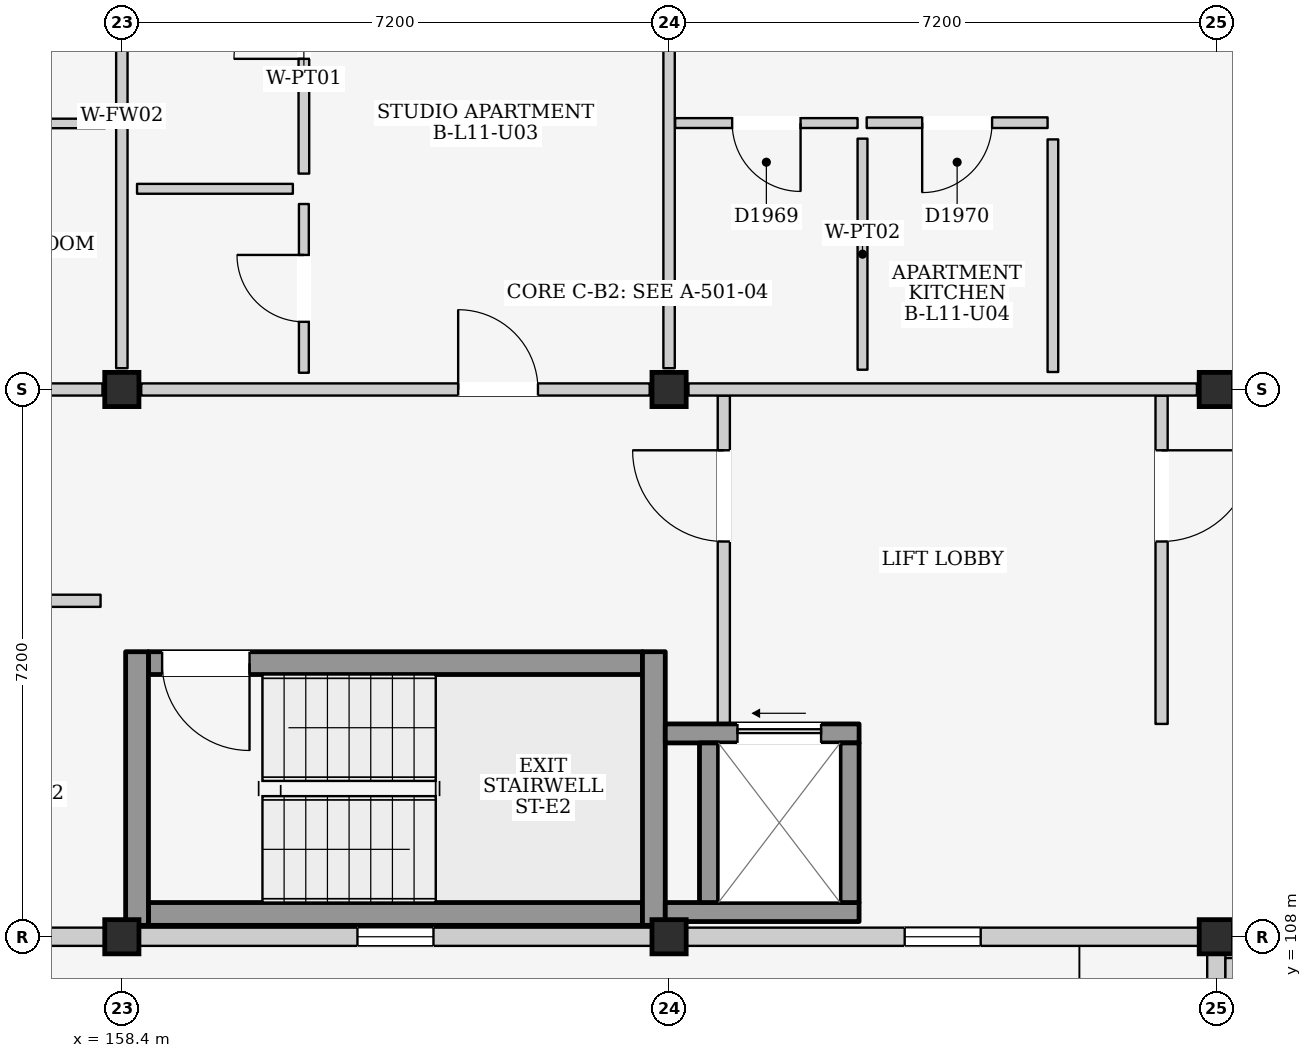
"""IFC4 building model, lengths in metres.
Left out: names, types, materials, properties, quantities, classifications, styles, units other than length and angle.
Written with IfcOpenShell. Run it as: python <this file> out.ifc"""

import sys

from ifc_helpers import new_model, si_unit, direction, frame, frame_2d, origin, origin_2d, place, context, subcontext, project, spatial, rectangle, extrude, element, fill, save


model = new_model("IFC4")
c1 = context("Model", 3, precision=1e-05, world=origin(), true_north=direction((0.0, 1.0)))
c2 = subcontext(c1, "Body", "Model", "MODEL_VIEW")
j1 = project(units=[si_unit("LENGTHUNIT", "METRE"), si_unit("PLANEANGLEUNIT", "RADIAN")], contexts=[c1])
p1 = place(None, origin())
s1 = spatial("IfcSite", under=j1, at=p1, CompositionType="ELEMENT")
p2 = place(p1, origin())
s2 = spatial("IfcBuilding", under=s1, at=p2, CompositionType="ELEMENT")
p3 = place(p2, frame((0.0, 0.0, 38.0)))
s3 = spatial("IfcBuildingStorey", under=s2, at=p3, CompositionType="ELEMENT", Elevation=38.0)
for number, where, z_axis, x_axis in (
    (1, (158.4, 108.0, 0.0), (0.0, 0.0, 1.0), (1.0, 0.0, 0.0)),
    (2, (158.4, 115.2, 0.0), (0.0, 0.0, 1.0), (1.0, 0.0, 0.0)),
    (3, (165.6, 108.0, 0.0), (0.0, 0.0, 1.0), (1.0, 0.0, 0.0)),
    (4, (165.6, 115.2, 0.0), (0.0, 0.0, 1.0), (1.0, 0.0, 0.0)),
    (5, (172.8, 108.0, 0.0), (0.0, 0.0, 1.0), (1.0, 0.0, 0.0)),
    (6, (172.8, 115.2, 0.0), (0.0, 0.0, 1.0), (1.0, 0.0, 0.0)),
):
    element("IfcColumn", number, at=place(p3, frame(where, z_axis=z_axis, x_axis=x_axis)), inside=s3, PredefinedType="COLUMN", context=c2, shape_type="SweptSolid", body=[
        extrude(rectangle(XDim=0.45, YDim=0.45, at=origin_2d()), origin(), (0.0, 0.0, 1.0), 3.2),
    ])
p4 = place(p3, frame((151.425, 108.0, 0.0), z_axis=(0.0, 0.0, 1.0), x_axis=(1.0, 0.0, 0.0)))
e7 = element("IfcWall", 7, at=p4, inside=s3, PredefinedType="ELEMENTEDWALL", context=c2, shape_type="SweptSolid", body=[
    extrude(rectangle(XDim=6.75, YDim=0.24, at=frame_2d((3.375, 0.0))), origin(), (0.0, 0.0, 1.0), 2.375),
])
p5 = place(p4, frame((1.1, 0.0, 0.0)))
e8 = element("IfcOpeningElement", 8, at=p5, cuts=e7, PredefinedType="OPENING", context=c2, shape_type="SweptSolid", body=[
    extrude(rectangle(XDim=1.5, YDim=2.12, at=frame_2d((0.75, 1.06))), frame((0.0, 0.135, 0.0), z_axis=(0.0, -1.0, 0.0), x_axis=(1.0, 0.0, 0.0)), (0.0, 0.0, 1.0), 0.27),
])
p6 = place(p4, frame((3.6, 0.0, 0.765)))
e9 = element("IfcOpeningElement", 9, at=p6, cuts=e7, PredefinedType="OPENING", context=c2, shape_type="SweptSolid", body=[
    extrude(rectangle(XDim=1.35, YDim=1.5, at=frame_2d((0.675, 0.75))), frame((0.0, 0.135, 0.0), z_axis=(0.0, -1.0, 0.0), x_axis=(1.0, 0.0, 0.0)), (0.0, 0.0, 1.0), 0.27),
])
p7 = place(p3, frame((158.625, 108.0, 0.0), z_axis=(0.0, 0.0, 1.0), x_axis=(1.0, 0.0, 0.0)))
e10 = element("IfcWall", 10, at=p7, inside=s3, PredefinedType="ELEMENTEDWALL", context=c2, shape_type="SweptSolid", body=[
    extrude(rectangle(XDim=6.75, YDim=0.24, at=frame_2d((3.375, 0.0))), origin(), (0.0, 0.0, 1.0), 2.375),
])
p8 = place(p7, frame((2.875, 0.0, 1.2)))
e11 = element("IfcOpeningElement", 11, at=p8, cuts=e10, PredefinedType="OPENING", context=c2, shape_type="SweptSolid", body=[
    extrude(rectangle(XDim=1.0, YDim=0.9, at=frame_2d((0.5, 0.45))), frame((0.0, 0.135, 0.0), z_axis=(0.0, -1.0, 0.0), x_axis=(1.0, 0.0, 0.0)), (0.0, 0.0, 1.0), 0.27),
])
p9 = place(p3, frame((165.825, 108.0, 0.0), z_axis=(0.0, 0.0, 1.0), x_axis=(1.0, 0.0, 0.0)))
e12 = element("IfcWall", 12, at=p9, inside=s3, PredefinedType="ELEMENTEDWALL", context=c2, shape_type="SweptSolid", body=[
    extrude(rectangle(XDim=6.75, YDim=0.24, at=frame_2d((3.375, 0.0))), origin(), (0.0, 0.0, 1.0), 2.375),
])
p10 = place(p9, frame((2.875, 0.0, 1.2)))
e13 = element("IfcOpeningElement", 13, at=p10, cuts=e12, PredefinedType="OPENING", context=c2, shape_type="SweptSolid", body=[
    extrude(rectangle(XDim=1.0, YDim=0.9, at=frame_2d((0.5, 0.45))), frame((0.0, 0.135, 0.0), z_axis=(0.0, -1.0, 0.0), x_axis=(1.0, 0.0, 0.0)), (0.0, 0.0, 1.0), 0.27),
])
p11 = place(p3, frame((172.8, 101.025, 0.0), z_axis=(0.0, 0.0, 1.0), x_axis=(0.0, 1.0, 0.0)))
e14 = element("IfcWall", 14, at=p11, inside=s3, PredefinedType="ELEMENTEDWALL", context=c2, shape_type="SweptSolid", body=[
    extrude(rectangle(XDim=6.75, YDim=0.24, at=frame_2d((3.375, 0.0))), origin(), (0.0, 0.0, 1.0), 2.475),
])
p12 = place(p11, frame((2.5, 0.0, 0.0)))
e15 = element("IfcOpeningElement", 15, at=p12, cuts=e14, PredefinedType="OPENING", context=c2, shape_type="SweptSolid", body=[
    extrude(rectangle(XDim=1.4, YDim=2.1, at=frame_2d((0.7, 1.05))), frame((0.0, 0.135, 0.0), z_axis=(0.0, -1.0, 0.0), x_axis=(1.0, 0.0, 0.0)), (0.0, 0.0, 1.0), 0.27),
])
p13 = place(p3, frame((158.75, 108.3, 0.0), z_axis=(0.0, 0.0, 1.0), x_axis=(1.0, 0.0, 0.0)))
e16 = element("IfcWall", 16, at=p13, inside=s3, PredefinedType="SHEAR", context=c2, shape_type="SweptSolid", body=[
    extrude(rectangle(XDim=6.5, YDim=0.3, at=frame_2d((3.25, 0.0))), origin(), (0.0, 0.0, 1.0), 2.99),
])
p14 = place(p3, frame((158.75, 111.6, 0.0), z_axis=(0.0, 0.0, 1.0), x_axis=(1.0, 0.0, 0.0)))
e17 = element("IfcWall", 17, at=p14, inside=s3, PredefinedType="SHEAR", context=c2, shape_type="SweptSolid", body=[
    extrude(rectangle(XDim=6.5, YDim=0.3, at=frame_2d((3.25, 0.0))), origin(), (0.0, 0.0, 1.0), 2.99),
])
p15 = place(p14, frame((0.18, 0.0, 0.0)))
e18 = element("IfcOpeningElement", 18, at=p15, cuts=e17, PredefinedType="OPENING", context=c2, shape_type="SweptSolid", body=[
    extrude(rectangle(XDim=1.15, YDim=2.2, at=frame_2d((0.575, 1.1))), frame((0.0, 0.165, 0.0), z_axis=(0.0, -1.0, 0.0), x_axis=(1.0, 0.0, 0.0)), (0.0, 0.0, 1.0), 0.33),
])
for number, where, z_axis, x_axis in (
    (19, (158.6, 108.15, 0.0), (0.0, 0.0, 1.0), (0.0, 1.0, 0.0)),
    (20, (165.4, 108.15, 0.0), (0.0, 0.0, 1.0), (0.0, 1.0, 0.0)),
):
    element("IfcWall", number, at=place(p3, frame(where, z_axis=z_axis, x_axis=x_axis)), inside=s3, PredefinedType="SHEAR", context=c2, shape_type="SweptSolid", body=[
        extrude(rectangle(XDim=3.6, YDim=0.3, at=frame_2d((1.8, 0.0))), origin(), (0.0, 0.0, 1.0), 2.99),
    ])
p16 = place(p3, frame((166.32, 110.8, 0.0), z_axis=(0.0, 0.0, 1.0), x_axis=(0.0, 1.0, 0.0)))
e21 = element("IfcWall", 21, at=p16, inside=s3, PredefinedType="PARTITIONING", context=c2, shape_type="SweptSolid", body=[
    extrude(rectangle(XDim=4.32, YDim=0.16, at=frame_2d((2.16, 0.0))), origin(), (0.0, 0.0, 1.0), 2.99),
])
p17 = place(p16, frame((2.4, 0.0, 0.0)))
e22 = element("IfcOpeningElement", 22, at=p17, cuts=e21, PredefinedType="OPENING", context=c2, shape_type="SweptSolid", body=[
    extrude(rectangle(XDim=1.2, YDim=2.2, at=frame_2d((0.6, 1.1))), frame((0.0, 0.095, 0.0), z_axis=(0.0, -1.0, 0.0), x_axis=(1.0, 0.0, 0.0)), (0.0, 0.0, 1.0), 0.19),
])
p18 = place(p3, frame((172.08, 110.8, 0.0), z_axis=(0.0, 0.0, 1.0), x_axis=(0.0, 1.0, 0.0)))
e23 = element("IfcWall", 23, at=p18, inside=s3, PredefinedType="PARTITIONING", context=c2, shape_type="SweptSolid", body=[
    extrude(rectangle(XDim=4.32, YDim=0.16, at=frame_2d((2.16, 0.0))), origin(), (0.0, 0.0, 1.0), 2.99),
])
p19 = place(p18, frame((2.4, 0.0, 0.0)))
e24 = element("IfcOpeningElement", 24, at=p19, cuts=e23, PredefinedType="OPENING", context=c2, shape_type="SweptSolid", body=[
    extrude(rectangle(XDim=1.2, YDim=2.2, at=frame_2d((0.6, 1.1))), frame((0.0, 0.095, 0.0), z_axis=(0.0, -1.0, 0.0), x_axis=(1.0, 0.0, 0.0)), (0.0, 0.0, 1.0), 0.19),
])
p20 = place(p3, frame((165.55, 108.325, 0.0), z_axis=(0.0, 0.0, 1.0), x_axis=(1.0, 0.0, 0.0)))
e25 = element("IfcWall", 25, at=p20, inside=s3, PredefinedType="SHEAR", context=c2, shape_type="SweptSolid", body=[
    extrude(rectangle(XDim=2.55, YDim=0.25, at=frame_2d((1.275, 0.0))), origin(), (0.0, 0.0, 1.0), 2.99),
])
p21 = place(p3, frame((165.55, 110.675, 0.0), z_axis=(0.0, 0.0, 1.0), x_axis=(1.0, 0.0, 0.0)))
e26 = element("IfcWall", 26, at=p21, inside=s3, PredefinedType="SHEAR", context=c2, shape_type="SweptSolid", body=[
    extrude(rectangle(XDim=2.55, YDim=0.25, at=frame_2d((1.275, 0.0))), origin(), (0.0, 0.0, 1.0), 2.99),
])
p22 = place(p21, frame((0.95, 0.0, 0.0)))
e27 = element("IfcOpeningElement", 27, at=p22, cuts=e26, PredefinedType="OPENING", context=c2, shape_type="SweptSolid", body=[
    extrude(rectangle(XDim=1.1, YDim=2.15, at=frame_2d((0.55, 1.075))), frame((0.0, 0.14, 0.0), z_axis=(0.0, -1.0, 0.0), x_axis=(1.0, 0.0, 0.0)), (0.0, 0.0, 1.0), 0.28),
])
for number, where, z_axis, x_axis in (
    (28, (166.125, 108.45, 0.0), (0.0, 0.0, 1.0), (0.0, 1.0, 0.0)),
    (29, (167.975, 108.45, 0.0), (0.0, 0.0, 1.0), (0.0, 1.0, 0.0)),
):
    element("IfcWall", number, at=place(p3, frame(where, z_axis=z_axis, x_axis=x_axis)), inside=s3, PredefinedType="SHEAR", context=c2, shape_type="SweptSolid", body=[
        extrude(rectangle(XDim=2.1, YDim=0.25, at=frame_2d((1.05, 0.0))), origin(), (0.0, 0.0, 1.0), 2.99),
    ])
p23 = place(p3, frame((151.455, 115.2, 0.0), z_axis=(0.0, 0.0, 1.0), x_axis=(1.0, 0.0, 0.0)))
e30 = element("IfcWall", 30, at=p23, inside=s3, PredefinedType="PARTITIONING", context=c2, shape_type="SweptSolid", body=[
    extrude(rectangle(XDim=6.69, YDim=0.16, at=frame_2d((3.345, 0.0))), origin(), (0.0, 0.0, 1.0), 2.375),
])
p24 = place(p23, frame((0.18, 0.0, 0.0)))
e31 = element("IfcOpeningElement", 31, at=p24, cuts=e30, PredefinedType="OPENING", context=c2, shape_type="SweptSolid", body=[
    extrude(rectangle(XDim=1.05, YDim=2.15, at=frame_2d((0.525, 1.075))), frame((0.0, 0.095, 0.0), z_axis=(0.0, -1.0, 0.0), x_axis=(1.0, 0.0, 0.0)), (0.0, 0.0, 1.0), 0.19),
])
p25 = place(p3, frame((158.4, 115.48, 0.0), z_axis=(0.0, 0.0, 1.0), x_axis=(0.0, 1.0, 0.0)))
e32 = element("IfcWall", 32, at=p25, inside=s3, PredefinedType="PARTITIONING", context=c2, shape_type="SweptSolid", body=[
    extrude(rectangle(XDim=6.64, YDim=0.15, at=frame_2d((3.32, 0.0))), origin(), (0.0, 0.0, 1.0), 2.475),
])
p26 = place(p3, frame((154.12, 118.7, 0.0), z_axis=(0.0, 0.0, 1.0), x_axis=(1.0, 0.0, 0.0)))
e33 = element("IfcWall", 33, at=p26, inside=s3, PredefinedType="PARTITIONING", context=c2, shape_type="SweptSolid", body=[
    extrude(rectangle(XDim=4.06, YDim=0.125, at=frame_2d((2.03, 0.0))), origin(), (0.0, 0.0, 1.0), 2.99),
])
p27 = place(p3, frame((158.655, 115.2, 0.0), z_axis=(0.0, 0.0, 1.0), x_axis=(1.0, 0.0, 0.0)))
e34 = element("IfcWall", 34, at=p27, inside=s3, PredefinedType="PARTITIONING", context=c2, shape_type="SweptSolid", body=[
    extrude(rectangle(XDim=6.69, YDim=0.16, at=frame_2d((3.345, 0.0))), origin(), (0.0, 0.0, 1.0), 2.375),
])
p28 = place(p27, frame((4.17, 0.0, 0.0)))
e35 = element("IfcOpeningElement", 35, at=p28, cuts=e34, PredefinedType="OPENING", context=c2, shape_type="SweptSolid", body=[
    extrude(rectangle(XDim=1.05, YDim=2.15, at=frame_2d((0.525, 1.075))), frame((0.0, 0.095, 0.0), z_axis=(0.0, -1.0, 0.0), x_axis=(1.0, 0.0, 0.0)), (0.0, 0.0, 1.0), 0.19),
])
p29 = place(p3, frame((165.6, 115.48, 0.0), z_axis=(0.0, 0.0, 1.0), x_axis=(0.0, 1.0, 0.0)))
e36 = element("IfcWall", 36, at=p29, inside=s3, PredefinedType="PARTITIONING", context=c2, shape_type="SweptSolid", body=[
    extrude(rectangle(XDim=6.64, YDim=0.15, at=frame_2d((3.32, 0.0))), origin(), (0.0, 0.0, 1.0), 2.475),
])
p30 = place(p3, frame((158.6, 117.84, 0.0), z_axis=(0.0, 0.0, 1.0), x_axis=(1.0, 0.0, 0.0)))
e37 = element("IfcWall", 37, at=p30, inside=s3, PredefinedType="PARTITIONING", context=c2, shape_type="SweptSolid", body=[
    extrude(rectangle(XDim=2.05, YDim=0.13, at=frame_2d((1.025, 0.0))), origin(), (0.0, 0.0, 1.0), 2.99),
])
p31 = place(p3, frame((160.795, 115.42, 0.0), z_axis=(0.0, 0.0, 1.0), x_axis=(0.0, 1.0, 0.0)))
e38 = element("IfcWall", 38, at=p31, inside=s3, PredefinedType="PARTITIONING", context=c2, shape_type="SweptSolid", body=[
    extrude(rectangle(XDim=2.22, YDim=0.13, at=frame_2d((1.11, 0.0))), origin(), (0.0, 0.0, 1.0), 2.99),
])
p32 = place(p31, frame((0.67, 0.0, 0.0)))
e39 = element("IfcOpeningElement", 39, at=p32, cuts=e38, PredefinedType="OPENING", context=c2, shape_type="SweptSolid", body=[
    extrude(rectangle(XDim=0.88, YDim=2.1, at=frame_2d((0.44, 1.05))), frame((0.0, 0.08, 0.0), z_axis=(0.0, -1.0, 0.0), x_axis=(1.0, 0.0, 0.0)), (0.0, 0.0, 1.0), 0.16),
])
p33 = place(p3, frame((160.795, 118.04, 0.0), z_axis=(0.0, 0.0, 1.0), x_axis=(0.0, 1.0, 0.0)))
e40 = element("IfcWall", 40, at=p33, inside=s3, PredefinedType="PARTITIONING", context=c2, shape_type="SweptSolid", body=[
    extrude(rectangle(XDim=3.94, YDim=0.14, at=frame_2d((1.97, 0.0))), origin(), (0.0, 0.0, 1.0), 2.99),
])
p34 = place(p33, frame((1.51, 0.0, 0.0)))
e41 = element("IfcOpeningElement", 41, at=p34, cuts=e40, PredefinedType="OPENING", context=c2, shape_type="SweptSolid", body=[
    extrude(rectangle(XDim=0.92, YDim=2.1, at=frame_2d((0.46, 1.05))), frame((0.0, 0.085, 0.0), z_axis=(0.0, -1.0, 0.0), x_axis=(1.0, 0.0, 0.0)), (0.0, 0.0, 1.0), 0.17),
])
p35 = place(p3, frame((165.855, 115.2, 0.0), z_axis=(0.0, 0.0, 1.0), x_axis=(1.0, 0.0, 0.0)))
e42 = element("IfcWall", 42, at=p35, inside=s3, PredefinedType="PARTITIONING", context=c2, shape_type="SweptSolid", body=[
    extrude(rectangle(XDim=6.69, YDim=0.16, at=frame_2d((3.345, 0.0))), origin(), (0.0, 0.0, 1.0), 2.375),
])
p36 = place(p3, frame((165.68, 118.705, 0.0), z_axis=(0.0, 0.0, 1.0), x_axis=(1.0, 0.0, 0.0)))
e43 = element("IfcWall", 43, at=p36, inside=s3, PredefinedType="PARTITIONING", context=c2, shape_type="SweptSolid", body=[
    extrude(rectangle(XDim=2.4, YDim=0.13, at=frame_2d((1.2, 0.0))), origin(), (0.0, 0.0, 1.0), 2.99),
])
p37 = place(p36, frame((0.75, 0.0, 0.0)))
e44 = element("IfcOpeningElement", 44, at=p37, cuts=e43, PredefinedType="OPENING", context=c2, shape_type="SweptSolid", body=[
    extrude(rectangle(XDim=0.9, YDim=2.1, at=frame_2d((0.45, 1.05))), frame((0.0, 0.08, 0.0), z_axis=(0.0, -1.0, 0.0), x_axis=(1.0, 0.0, 0.0)), (0.0, 0.0, 1.0), 0.16),
])
p38 = place(p3, frame((168.145, 115.46, 0.0), z_axis=(0.0, 0.0, 1.0), x_axis=(0.0, 1.0, 0.0)))
e45 = element("IfcWall", 45, at=p38, inside=s3, PredefinedType="PARTITIONING", context=c2, shape_type="SweptSolid", body=[
    extrude(rectangle(XDim=3.04, YDim=0.13, at=frame_2d((1.52, 0.0))), origin(), (0.0, 0.0, 1.0), 2.99),
])
p39 = place(p3, frame((168.2, 118.71, 0.0), z_axis=(0.0, 0.0, 1.0), x_axis=(1.0, 0.0, 0.0)))
e46 = element("IfcWall", 46, at=p39, inside=s3, PredefinedType="PARTITIONING", context=c2, shape_type="SweptSolid", body=[
    extrude(rectangle(XDim=2.38, YDim=0.14, at=frame_2d((1.19, 0.0))), origin(), (0.0, 0.0, 1.0), 2.99),
])
p40 = place(p39, frame((0.73, 0.0, 0.0)))
e47 = element("IfcOpeningElement", 47, at=p40, cuts=e46, PredefinedType="OPENING", context=c2, shape_type="SweptSolid", body=[
    extrude(rectangle(XDim=0.92, YDim=2.1, at=frame_2d((0.46, 1.05))), frame((0.0, 0.085, 0.0), z_axis=(0.0, -1.0, 0.0), x_axis=(1.0, 0.0, 0.0)), (0.0, 0.0, 1.0), 0.17),
])
p41 = place(p3, frame((170.65, 115.43, 0.0), z_axis=(0.0, 0.0, 1.0), x_axis=(0.0, 1.0, 0.0)))
e48 = element("IfcWall", 48, at=p41, inside=s3, PredefinedType="PARTITIONING", context=c2, shape_type="SweptSolid", body=[
    extrude(rectangle(XDim=3.06, YDim=0.14, at=frame_2d((1.53, 0.0))), origin(), (0.0, 0.0, 1.0), 2.99),
])
p42 = place(p3, frame((151.48, 112.42, 0.0), z_axis=(0.0, 0.0, 1.0), x_axis=(1.0, 0.0, 0.0)))
e49 = element("IfcWall", 49, at=p42, inside=s3, PredefinedType="PARTITIONING", context=c2, shape_type="SweptSolid", body=[
    extrude(rectangle(XDim=6.64, YDim=0.16, at=frame_2d((3.32, 0.0))), origin(), (0.0, 0.0, 1.0), 2.99),
])
p43 = place(p42, frame((2.85, 0.0, 0.0)))
e50 = element("IfcOpeningElement", 50, at=p43, cuts=e49, PredefinedType="OPENING", context=c2, shape_type="SweptSolid", body=[
    extrude(rectangle(XDim=0.94, YDim=2.12, at=frame_2d((0.47, 1.06))), frame((0.0, 0.095, 0.0), z_axis=(0.0, -1.0, 0.0), x_axis=(1.0, 0.0, 0.0)), (0.0, 0.0, 1.0), 0.19),
])
p44 = place(p3, frame((173.0, 101.08, 0.0), z_axis=(0.0, 0.0, 1.0), x_axis=(0.0, 1.0, 0.0)))
e51 = element("IfcWall", 51, at=p44, inside=s3, PredefinedType="PARTITIONING", context=c2, shape_type="SweptSolid", body=[
    extrude(rectangle(XDim=6.64, YDim=0.16, at=frame_2d((3.32, 0.0))), origin(), (0.0, 0.0, 1.0), 2.99),
])
p45 = place(p44, frame((2.81, 0.0, 0.0)))
e52 = element("IfcOpeningElement", 52, at=p45, cuts=e51, PredefinedType="OPENING", context=c2, shape_type="SweptSolid", body=[
    extrude(rectangle(XDim=1.02, YDim=2.18, at=frame_2d((0.51, 1.09))), frame((0.0, 0.095, 0.0), z_axis=(0.0, -1.0, 0.0), x_axis=(1.0, 0.0, 0.0)), (0.0, 0.0, 1.0), 0.19),
])
p46 = place(p8, origin())
e53 = element("IfcWindow", 53, at=p46, inside=s3, PartitioningType="SINGLE_PANEL", PredefinedType="WINDOW", context=c2, shape_type="SweptSolid", body=[
    extrude(rectangle(XDim=1.0, YDim=0.9, at=frame_2d((0.5, 0.45))), frame((0.0, 0.03, 0.0), z_axis=(0.0, -1.0, 0.0), x_axis=(1.0, 0.0, 0.0)), (0.0, 0.0, 1.0), 0.06),
])
fill(e11, e53)
p47 = place(p10, origin())
e54 = element("IfcWindow", 54, at=p47, inside=s3, PartitioningType="SINGLE_PANEL", PredefinedType="WINDOW", context=c2, shape_type="SweptSolid", body=[
    extrude(rectangle(XDim=1.0, YDim=0.9, at=frame_2d((0.5, 0.45))), frame((0.0, 0.03, 0.0), z_axis=(0.0, -1.0, 0.0), x_axis=(1.0, 0.0, 0.0)), (0.0, 0.0, 1.0), 0.06),
])
fill(e13, e54)
p48 = place(p15, frame((1.15, 0.0, 0.0), z_axis=(0.0, 0.0, 1.0), x_axis=(-1.0, 0.0, 0.0)))
e55 = element("IfcDoor", 55, at=p48, inside=s3, OperationType="SINGLE_SWING_LEFT", PredefinedType="DOOR", context=c2, shape_type="SweptSolid", body=[
    extrude(rectangle(XDim=1.15, YDim=2.2, at=frame_2d((0.575, 1.1))), frame((0.0, 0.025, 0.0), z_axis=(0.0, -1.0, 0.0), x_axis=(1.0, 0.0, 0.0)), (0.0, 0.0, 1.0), 0.05),
])
fill(e18, e55)
p49 = place(p17, origin())
e56 = element("IfcDoor", 56, at=p49, inside=s3, OperationType="SINGLE_SWING_RIGHT", PredefinedType="DOOR", context=c2, shape_type="SweptSolid", body=[
    extrude(rectangle(XDim=1.2, YDim=2.2, at=frame_2d((0.6, 1.1))), frame((0.0, 0.025, 0.0), z_axis=(0.0, -1.0, 0.0), x_axis=(1.0, 0.0, 0.0)), (0.0, 0.0, 1.0), 0.05),
])
fill(e22, e56)
p50 = place(p19, frame((1.2, 0.0, 0.0), z_axis=(0.0, 0.0, 1.0), x_axis=(-1.0, 0.0, 0.0)))
e57 = element("IfcDoor", 57, at=p50, inside=s3, OperationType="SINGLE_SWING_LEFT", PredefinedType="DOOR", context=c2, shape_type="SweptSolid", body=[
    extrude(rectangle(XDim=1.2, YDim=2.2, at=frame_2d((0.6, 1.1))), frame((0.0, 0.025, 0.0), z_axis=(0.0, -1.0, 0.0), x_axis=(1.0, 0.0, 0.0)), (0.0, 0.0, 1.0), 0.05),
])
fill(e24, e57)
p51 = place(p22, origin())
e58 = element("IfcDoor", 58, at=p51, inside=s3, OperationType="SLIDING_TO_LEFT", PredefinedType="DOOR", context=c2, shape_type="SweptSolid", body=[
    extrude(rectangle(XDim=1.1, YDim=2.15, at=frame_2d((0.55, 1.075))), frame((0.0, 0.025, 0.0), z_axis=(0.0, -1.0, 0.0), x_axis=(1.0, 0.0, 0.0)), (0.0, 0.0, 1.0), 0.05),
])
fill(e27, e58)
p52 = place(p28, origin())
e59 = element("IfcDoor", 59, at=p52, inside=s3, OperationType="SINGLE_SWING_LEFT", PredefinedType="DOOR", context=c2, shape_type="SweptSolid", body=[
    extrude(rectangle(XDim=1.05, YDim=2.15, at=frame_2d((0.525, 1.075))), frame((0.0, 0.025, 0.0), z_axis=(0.0, -1.0, 0.0), x_axis=(1.0, 0.0, 0.0)), (0.0, 0.0, 1.0), 0.05),
])
fill(e35, e59)
p53 = place(p32, origin())
e60 = element("IfcDoor", 60, at=p53, inside=s3, OperationType="SINGLE_SWING_RIGHT", PredefinedType="DOOR", context=c2, shape_type="SweptSolid", body=[
    extrude(rectangle(XDim=0.88, YDim=2.1, at=frame_2d((0.44, 1.05))), frame((0.0, 0.025, 0.0), z_axis=(0.0, -1.0, 0.0), x_axis=(1.0, 0.0, 0.0)), (0.0, 0.0, 1.0), 0.05),
])
fill(e39, e60)
p54 = place(p34, origin())
e61 = element("IfcDoor", 61, at=p54, inside=s3, OperationType="SINGLE_SWING_LEFT", PredefinedType="DOOR", context=c2, shape_type="SweptSolid", body=[
    extrude(rectangle(XDim=0.92, YDim=2.1, at=frame_2d((0.46, 1.05))), frame((0.0, 0.025, 0.0), z_axis=(0.0, -1.0, 0.0), x_axis=(1.0, 0.0, 0.0)), (0.0, 0.0, 1.0), 0.05),
])
fill(e41, e61)
p55 = place(p37, frame((0.9, 0.0, 0.0), z_axis=(0.0, 0.0, 1.0), x_axis=(-1.0, 0.0, 0.0)))
e62 = element("IfcDoor", 62, at=p55, inside=s3, OperationType="SINGLE_SWING_LEFT", PredefinedType="DOOR", context=c2, shape_type="SweptSolid", body=[
    extrude(rectangle(XDim=0.9, YDim=2.1, at=frame_2d((0.45, 1.05))), frame((0.0, 0.025, 0.0), z_axis=(0.0, -1.0, 0.0), x_axis=(1.0, 0.0, 0.0)), (0.0, 0.0, 1.0), 0.05),
])
fill(e44, e62)
p56 = place(p40, frame((0.92, 0.0, 0.0), z_axis=(0.0, 0.0, 1.0), x_axis=(-1.0, 0.0, 0.0)))
e63 = element("IfcDoor", 63, at=p56, inside=s3, OperationType="SINGLE_SWING_RIGHT", PredefinedType="DOOR", context=c2, shape_type="SweptSolid", body=[
    extrude(rectangle(XDim=0.92, YDim=2.1, at=frame_2d((0.46, 1.05))), frame((0.0, 0.025, 0.0), z_axis=(0.0, -1.0, 0.0), x_axis=(1.0, 0.0, 0.0)), (0.0, 0.0, 1.0), 0.05),
])
fill(e47, e63)
save(model, sys.argv[1])
